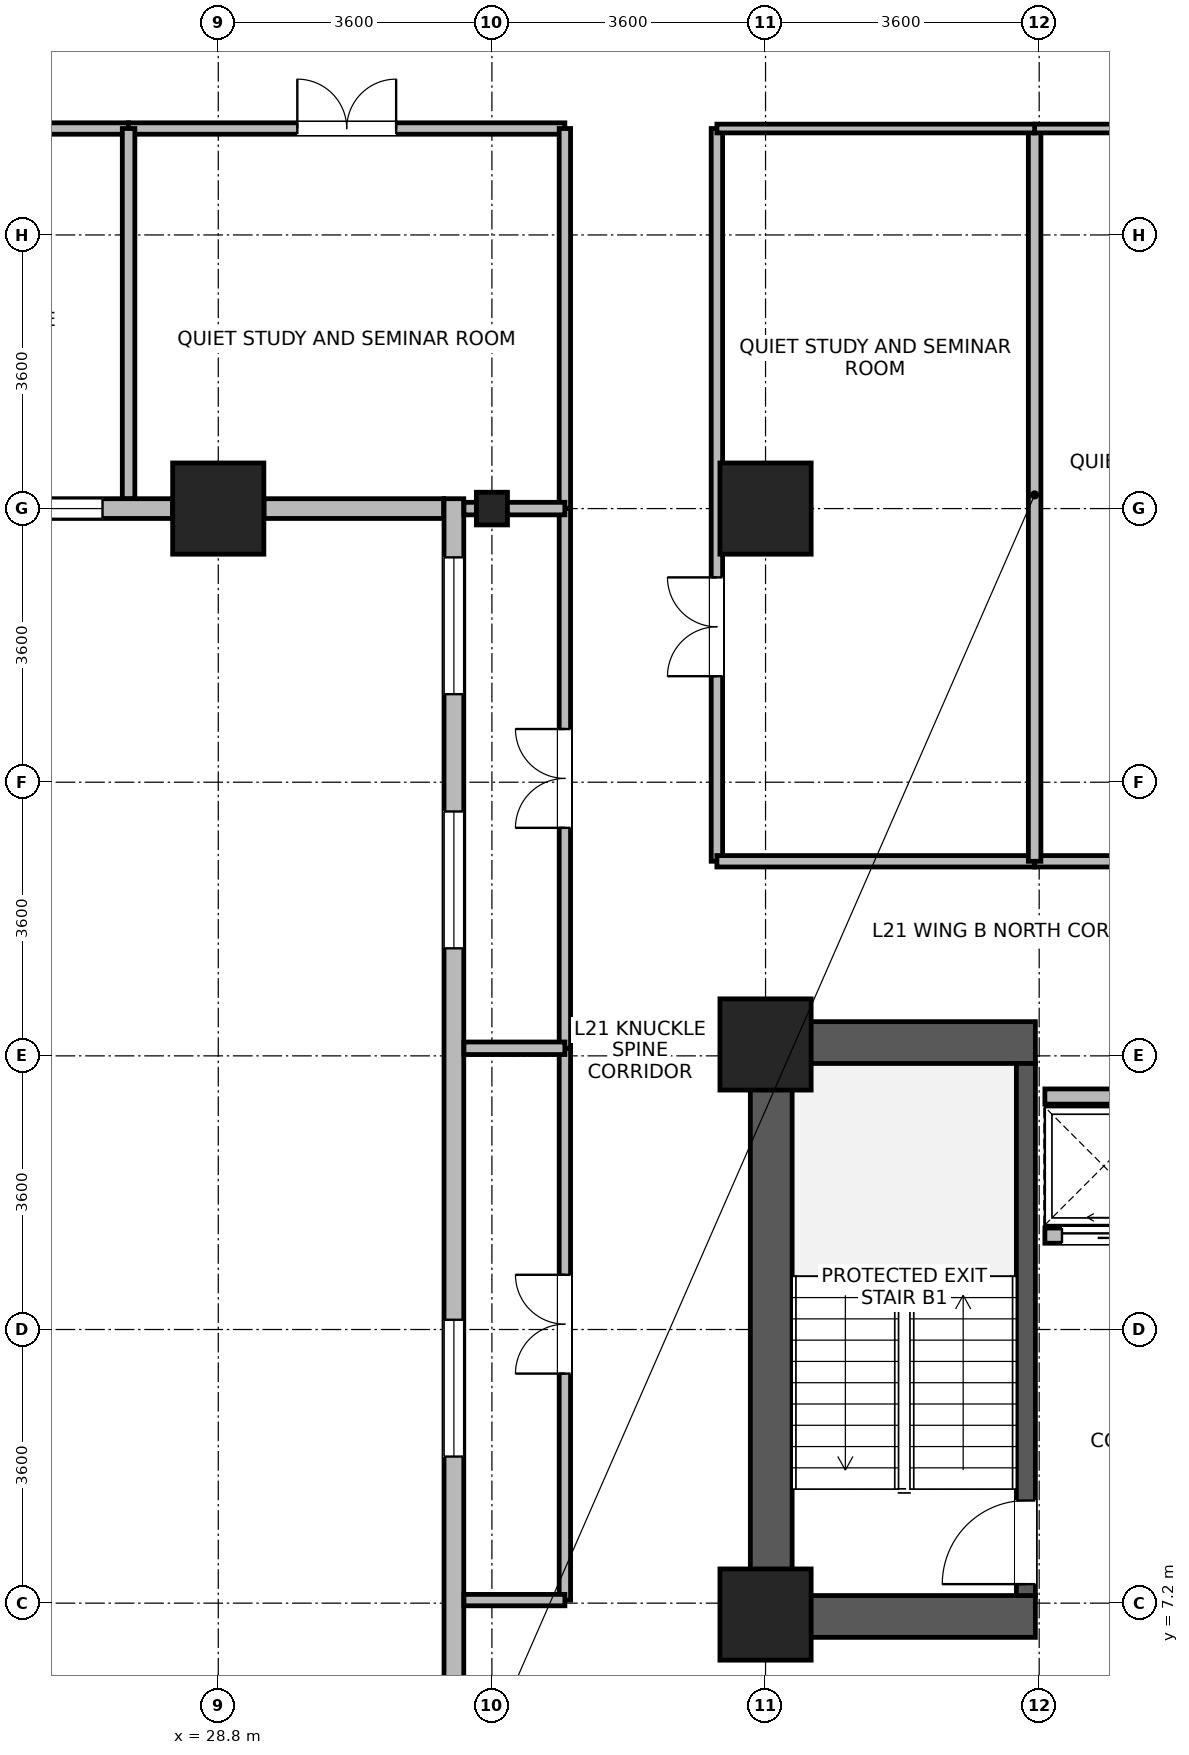
"""IFC4 building model, lengths in metres.
Left out: names, types, materials, properties, quantities, classifications, styles, units other than length and angle.
Written with IfcOpenShell. Run it as: python <this file> out.ifc"""

import sys

from ifc_helpers import new_model, si_unit, direction, frame, frame_2d, origin, origin_2d, place, context, subcontext, project, spatial, rectangle, i_section, extrude, source, transform, mapped, element, fill, save


model = new_model("IFC4")
c1 = context("Model", 3, precision=1e-05, world=origin(), true_north=direction((0.0, 1.0)))
c2 = subcontext(c1, "Body", "Model", "MODEL_VIEW")
j1 = project(units=[si_unit("LENGTHUNIT", "METRE"), si_unit("PLANEANGLEUNIT", "RADIAN")], contexts=[c1])
p1 = place(None, origin())
s1 = spatial("IfcSite", under=j1, at=p1, CompositionType="ELEMENT")
p2 = place(p1, origin())
s2 = spatial("IfcBuilding", under=s1, at=p2, CompositionType="ELEMENT")
p3 = place(p2, frame((0.0, 0.0, 86.0)))
s3 = spatial("IfcBuildingStorey", under=s2, at=p3, CompositionType="ELEMENT", Elevation=86.0)
p4 = place(p3, frame((36.075, 6.75, 0.0), z_axis=(0.0, 0.0, 1.0), x_axis=(0.0, 1.0, 0.0)))
e1 = element("IfcWall", 1, at=p4, inside=s3, PredefinedType="SHEAR", context=c2, shape_type="SweptSolid", body=[
    extrude(rectangle(XDim=8.1, YDim=0.55, at=frame_2d((4.05, 0.0))), origin(), (0.0, 0.0, 1.0), 3.45),
])
for number, where, z_axis, x_axis in (
    (2, (36.35, 7.025, 0.0), (0.0, 0.0, 1.0), (1.0, 0.0, 0.0)),
    (3, (36.35, 14.575, 0.0), (0.0, 0.0, 1.0), (1.0, 0.0, 0.0)),
):
    element("IfcWall", number, at=place(p3, frame(where, z_axis=z_axis, x_axis=x_axis)), inside=s3, PredefinedType="SHEAR", context=c2, shape_type="SweptSolid", body=[
        extrude(rectangle(XDim=3.2, YDim=0.55, at=frame_2d((1.6, 0.0))), origin(), (0.0, 0.0, 1.0), 3.45),
    ])
p5 = place(p3, frame((39.425, 7.3, 0.0), z_axis=(0.0, 0.0, 1.0), x_axis=(0.0, 1.0, 0.0)))
e4 = element("IfcWall", 4, at=p5, inside=s3, PredefinedType="SHEAR", context=c2, shape_type="SweptSolid", body=[
    extrude(rectangle(XDim=7.0, YDim=0.25, at=frame_2d((3.5, 0.0))), origin(), (0.0, 0.0, 1.0), 3.45),
])
p6 = place(p5, frame((0.15, 0.0, 0.0)))
e5 = element("IfcOpeningElement", 5, at=p6, cuts=e4, PredefinedType="OPENING", context=c2, shape_type="SweptSolid", body=[
    extrude(rectangle(XDim=1.1, YDim=2.08, at=frame_2d((0.55, 1.04))), frame((0.0, 0.135, 0.0), z_axis=(0.0, -1.0, 0.0), x_axis=(1.0, 0.0, 0.0)), (0.0, 0.0, 1.0), 0.27),
])
m1 = source(origin(), c2, "Body", "SweptSolid", [
    extrude(rectangle(XDim=1.2, YDim=1.2, at=origin_2d()), origin(), (0.0, 0.0, 1.0), 3.7),
])
for number, where, z_axis, x_axis in (
    (6, (28.8, 21.6, 0.0), (0.0, 0.0, 1.0), (1.0, 0.0, 0.0)),
    (7, (36.0, 21.6, 0.0), (0.0, 0.0, 1.0), (1.0, 0.0, 0.0)),
    (8, (36.0, 7.05, 0.0), (0.0, 0.0, 1.0), (1.0, 0.0, 0.0)),
    (9, (36.0, 14.55, 0.0), (0.0, 0.0, 1.0), (1.0, 0.0, 0.0)),
):
    element("IfcColumn", number, at=place(p3, frame(where, z_axis=z_axis, x_axis=x_axis)), inside=s3, PredefinedType="COLUMN", context=c2, shape_type="MappedRepresentation", body=[
        mapped(m1, transform((0.0, 0.0, 0.0), x_axis=(1.0, 0.0, 0.0), y_axis=(0.0, 1.0, 0.0), z_axis=(0.0, 0.0, 1.0), scale=1.0)),
    ])
m2 = source(origin(), c2, "Body", "SweptSolid", [
    extrude(i_section(OverallWidth=0.409, OverallDepth=0.43, WebThickness=0.024, FlangeThickness=0.033, FilletRadius=0.015, at=origin_2d()), origin(), (0.0, 0.0, 1.0), 3.7),
])
p7 = place(p3, frame((32.4, 21.6, 0.0), z_axis=(0.0, 0.0, 1.0), x_axis=(1.0, 0.0, 0.0)))
e10 = element("IfcColumn", 10, at=p7, inside=s3, PredefinedType="COLUMN", context=c2, shape_type="MappedRepresentation", body=[
    mapped(m2, transform((0.0, 0.0, 0.0), x_axis=(1.0, 0.0, 0.0), y_axis=(0.0, 1.0, 0.0), z_axis=(0.0, 0.0, 1.0), scale=1.0)),
])
p8 = place(p3, frame((28.199, 21.6, 0.0), z_axis=(0.0, 0.0, 1.0), x_axis=(-1.0, 0.0, 0.0)))
e11 = element("IfcWall", 11, at=p8, inside=s3, PredefinedType="STANDARD", context=c2, shape_type="SweptSolid", body=[
    extrude(rectangle(XDim=2.793, YDim=0.26, at=frame_2d((1.397, 0.0))), origin(), (0.0, 0.0, 1.0), 2.93),
])
p9 = place(p8, frame((0.922, 0.0, 0.85)))
e12 = element("IfcOpeningElement", 12, at=p9, cuts=e11, PredefinedType="OPENING", context=c2, shape_type="SweptSolid", body=[
    extrude(rectangle(XDim=0.95, YDim=1.75, at=frame_2d((0.475, 0.875))), frame((0.0, 0.14, 0.0), z_axis=(0.0, -1.0, 0.0), x_axis=(1.0, 0.0, 0.0)), (0.0, 0.0, 1.0), 0.28),
])
p10 = place(p3, frame((31.765, 21.6, 0.0), z_axis=(0.0, 0.0, 1.0), x_axis=(-1.0, 0.0, 0.0)))
e13 = element("IfcWall", 13, at=p10, inside=s3, PredefinedType="STANDARD", context=c2, shape_type="SweptSolid", body=[
    extrude(rectangle(XDim=2.364, YDim=0.26, at=frame_2d((1.182, 0.0))), origin(), (0.0, 0.0, 1.0), 2.93),
])
p11 = place(p3, frame((31.9, 1.67, 0.0), z_axis=(0.0, 0.0, 1.0), x_axis=(0.0, 1.0, 0.0)))
e14 = element("IfcWall", 14, at=p11, inside=s3, PredefinedType="STANDARD", context=c2, shape_type="SweptSolid", body=[
    extrude(rectangle(XDim=20.06, YDim=0.26, at=frame_2d((10.03, 0.0))), origin(), (0.0, 0.0, 1.0), 3.43),
])
p12 = place(p11, frame((0.772, 0.0, 0.85)))
e15 = element("IfcOpeningElement", 15, at=p12, cuts=e14, PredefinedType="OPENING", context=c2, shape_type="SweptSolid", body=[
    extrude(rectangle(XDim=1.8, YDim=1.85, at=frame_2d((0.9, 0.925))), frame((0.0, 0.14, 0.0), z_axis=(0.0, -1.0, 0.0), x_axis=(1.0, 0.0, 0.0)), (0.0, 0.0, 1.0), 0.28),
])
p13 = place(p11, frame((7.458, 0.0, 0.85)))
e16 = element("IfcOpeningElement", 16, at=p13, cuts=e14, PredefinedType="OPENING", context=c2, shape_type="SweptSolid", body=[
    extrude(rectangle(XDim=1.8, YDim=1.85, at=frame_2d((0.9, 0.925))), frame((0.0, 0.14, 0.0), z_axis=(0.0, -1.0, 0.0), x_axis=(1.0, 0.0, 0.0)), (0.0, 0.0, 1.0), 0.28),
])
p14 = place(p11, frame((14.145, 0.0, 0.85)))
e17 = element("IfcOpeningElement", 17, at=p14, cuts=e14, PredefinedType="OPENING", context=c2, shape_type="SweptSolid", body=[
    extrude(rectangle(XDim=1.8, YDim=1.85, at=frame_2d((0.9, 0.925))), frame((0.0, 0.14, 0.0), z_axis=(0.0, -1.0, 0.0), x_axis=(1.0, 0.0, 0.0)), (0.0, 0.0, 1.0), 0.28),
])
p15 = place(p11, frame((17.488, 0.0, 0.85)))
e18 = element("IfcOpeningElement", 18, at=p15, cuts=e14, PredefinedType="OPENING", context=c2, shape_type="SweptSolid", body=[
    extrude(rectangle(XDim=1.8, YDim=1.85, at=frame_2d((0.9, 0.925))), frame((0.0, 0.14, 0.0), z_axis=(0.0, -1.0, 0.0), x_axis=(1.0, 0.0, 0.0)), (0.0, 0.0, 1.0), 0.28),
])
p16 = place(p3, frame((39.675, 12.035, 0.0), z_axis=(0.0, 0.0, 1.0), x_axis=(1.0, 0.0, 0.0)))
e19 = element("IfcWall", 19, at=p16, inside=s3, PredefinedType="PARTITIONING", context=c2, shape_type="SweptSolid", body=[
    extrude(rectangle(XDim=1.55, YDim=0.2, at=frame_2d((0.775, 0.0))), origin(), (0.0, 0.0, 1.0), 3.43),
])
p17 = place(p16, frame((0.225, 0.0, 0.0)))
e20 = element("IfcOpeningElement", 20, at=p17, cuts=e19, PredefinedType="OPENING", context=c2, shape_type="SweptSolid", body=[
    extrude(rectangle(XDim=1.1, YDim=2.12, at=frame_2d((0.55, 1.06))), frame((0.0, 0.11, 0.0), z_axis=(0.0, -1.0, 0.0), x_axis=(1.0, 0.0, 0.0)), (0.0, 0.0, 1.0), 0.22),
])
p18 = place(p3, frame((39.675, 13.865, 0.0), z_axis=(0.0, 0.0, 1.0), x_axis=(1.0, 0.0, 0.0)))
e21 = element("IfcWall", 21, at=p18, inside=s3, PredefinedType="PARTITIONING", context=c2, shape_type="SweptSolid", body=[
    extrude(rectangle(XDim=1.55, YDim=0.2, at=frame_2d((0.775, 0.0))), origin(), (0.0, 0.0, 1.0), 3.43),
])
p19 = place(p3, frame((17.66, 26.6, 0.0), z_axis=(0.0, 0.0, 1.0), x_axis=(1.0, 0.0, 0.0)))
e22 = element("IfcWall", 22, at=p19, inside=s3, PredefinedType="PARTITIONING", context=c2, shape_type="SweptSolid", body=[
    extrude(rectangle(XDim=9.96, YDim=0.15, at=frame_2d((4.98, 0.0))), origin(), (0.0, 0.0, 1.0), 3.43),
])
p20 = place(p19, frame((4.33, 0.0, 0.0)))
e23 = element("IfcOpeningElement", 23, at=p20, cuts=e22, PredefinedType="OPENING", context=c2, shape_type="SweptSolid", body=[
    extrude(rectangle(XDim=1.3, YDim=2.12, at=frame_2d((0.65, 1.06))), frame((0.0, 0.085, 0.0), z_axis=(0.0, -1.0, 0.0), x_axis=(1.0, 0.0, 0.0)), (0.0, 0.0, 1.0), 0.17),
])
p21 = place(p3, frame((35.36, 16.96, 0.0), z_axis=(0.0, 0.0, 1.0), x_axis=(0.0, 1.0, 0.0)))
e24 = element("IfcWall", 24, at=p21, inside=s3, PredefinedType="PARTITIONING", context=c2, shape_type="SweptSolid", body=[
    extrude(rectangle(XDim=9.64, YDim=0.15, at=frame_2d((4.82, 0.0))), origin(), (0.0, 0.0, 1.0), 3.43),
])
p22 = place(p21, frame((2.435, 0.0, 0.0)))
e25 = element("IfcOpeningElement", 25, at=p22, cuts=e24, PredefinedType="OPENING", context=c2, shape_type="SweptSolid", body=[
    extrude(rectangle(XDim=1.3, YDim=2.12, at=frame_2d((0.65, 1.06))), frame((0.0, 0.085, 0.0), z_axis=(0.0, -1.0, 0.0), x_axis=(1.0, 0.0, 0.0)), (0.0, 0.0, 1.0), 0.17),
])
p23 = place(p3, frame((33.36, 7.24, 0.0), z_axis=(0.0, 0.0, 1.0), x_axis=(0.0, 1.0, 0.0)))
e26 = element("IfcWall", 26, at=p23, inside=s3, PredefinedType="PARTITIONING", context=c2, shape_type="SweptSolid", body=[
    extrude(rectangle(XDim=7.26, YDim=0.15, at=frame_2d((3.63, 0.0))), origin(), (0.0, 0.0, 1.0), 3.43),
])
p24 = place(p23, frame((2.98, 0.0, 0.0)))
e27 = element("IfcOpeningElement", 27, at=p24, cuts=e26, PredefinedType="OPENING", context=c2, shape_type="SweptSolid", body=[
    extrude(rectangle(XDim=1.3, YDim=2.12, at=frame_2d((0.65, 1.06))), frame((0.0, 0.085, 0.0), z_axis=(0.0, -1.0, 0.0), x_axis=(1.0, 0.0, 0.0)), (0.0, 0.0, 1.0), 0.17),
])
p25 = place(p3, frame((33.36, 14.5, 0.0), z_axis=(0.0, 0.0, 1.0), x_axis=(0.0, 1.0, 0.0)))
e28 = element("IfcWall", 28, at=p25, inside=s3, PredefinedType="PARTITIONING", context=c2, shape_type="SweptSolid", body=[
    extrude(rectangle(XDim=7.1, YDim=0.15, at=frame_2d((3.55, 0.0))), origin(), (0.0, 0.0, 1.0), 3.43),
])
p26 = place(p25, frame((2.9, 0.0, 0.0)))
e29 = element("IfcOpeningElement", 29, at=p26, cuts=e28, PredefinedType="OPENING", context=c2, shape_type="SweptSolid", body=[
    extrude(rectangle(XDim=1.3, YDim=2.12, at=frame_2d((0.65, 1.06))), frame((0.0, 0.085, 0.0), z_axis=(0.0, -1.0, 0.0), x_axis=(1.0, 0.0, 0.0)), (0.0, 0.0, 1.0), 0.17),
])
p27 = place(p3, frame((27.62, 26.6, 0.0), z_axis=(0.0, 0.0, 1.0), x_axis=(1.0, 0.0, 0.0)))
e30 = element("IfcWall", 30, at=p27, inside=s3, PredefinedType="PARTITIONING", context=c2, shape_type="SweptSolid", body=[
    extrude(rectangle(XDim=5.74, YDim=0.15, at=frame_2d((2.87, 0.0))), origin(), (0.0, 0.0, 1.0), 3.43),
])
p28 = place(p27, frame((2.22, 0.0, 0.0)))
e31 = element("IfcOpeningElement", 31, at=p28, cuts=e30, PredefinedType="OPENING", context=c2, shape_type="SweptSolid", body=[
    extrude(rectangle(XDim=1.3, YDim=2.12, at=frame_2d((0.65, 1.06))), frame((0.0, 0.085, 0.0), z_axis=(0.0, -1.0, 0.0), x_axis=(1.0, 0.0, 0.0)), (0.0, 0.0, 1.0), 0.17),
])
p29 = place(p3, frame((33.36, 21.6, 0.0), z_axis=(0.0, 0.0, 1.0), x_axis=(0.0, 1.0, 0.0)))
e32 = element("IfcWall", 32, at=p29, inside=s3, PredefinedType="PARTITIONING", context=c2, shape_type="SweptSolid", body=[
    extrude(rectangle(XDim=5.0, YDim=0.15, at=frame_2d((2.5, 0.0))), origin(), (0.0, 0.0, 1.0), 3.43),
])
p30 = place(p3, frame((39.54, 16.96, 0.0), z_axis=(0.0, 0.0, 1.0), x_axis=(1.0, 0.0, 0.0)))
e33 = element("IfcWall", 33, at=p30, inside=s3, PredefinedType="PARTITIONING", context=c2, shape_type="SweptSolid", body=[
    extrude(rectangle(XDim=4.5, YDim=0.15, at=frame_2d((2.25, 0.0))), origin(), (0.0, 0.0, 1.0), 3.43),
])
p31 = place(p30, frame((1.6, 0.0, 0.0)))
e34 = element("IfcOpeningElement", 34, at=p31, cuts=e33, PredefinedType="OPENING", context=c2, shape_type="SweptSolid", body=[
    extrude(rectangle(XDim=1.3, YDim=2.12, at=frame_2d((0.65, 1.06))), frame((0.0, 0.085, 0.0), z_axis=(0.0, -1.0, 0.0), x_axis=(1.0, 0.0, 0.0)), (0.0, 0.0, 1.0), 0.17),
])
p32 = place(p3, frame((35.36, 16.96, 0.0), z_axis=(0.0, 0.0, 1.0), x_axis=(1.0, 0.0, 0.0)))
e35 = element("IfcWall", 35, at=p32, inside=s3, PredefinedType="PARTITIONING", context=c2, shape_type="SweptSolid", body=[
    extrude(rectangle(XDim=4.18, YDim=0.15, at=frame_2d((2.09, 0.0))), origin(), (0.0, 0.0, 1.0), 3.43),
])
p33 = place(p3, frame((32.032, 7.24, 0.0), z_axis=(0.0, 0.0, 1.0), x_axis=(1.0, 0.0, 0.0)))
e36 = element("IfcWall", 36, at=p33, inside=s3, PredefinedType="PARTITIONING", context=c2, shape_type="SweptSolid", body=[
    extrude(rectangle(XDim=1.328, YDim=0.15, at=frame_2d((0.664, 0.0))), origin(), (0.0, 0.0, 1.0), 3.43),
])
p34 = place(p3, frame((39.54, 16.96, 0.0), z_axis=(0.0, 0.0, 1.0), x_axis=(0.0, 1.0, 0.0)))
e37 = element("IfcWall", 37, at=p34, inside=s3, PredefinedType="PARTITIONING", context=c2, shape_type="SweptSolid", body=[
    extrude(rectangle(XDim=9.64, YDim=0.165, at=frame_2d((4.82, 0.0))), origin(), (0.0, 0.0, 1.0), 3.43),
])
p35 = place(p3, frame((27.62, 21.732, 0.0), z_axis=(0.0, 0.0, 1.0), x_axis=(0.0, 1.0, 0.0)))
e38 = element("IfcWall", 38, at=p35, inside=s3, PredefinedType="PARTITIONING", context=c2, shape_type="SweptSolid", body=[
    extrude(rectangle(XDim=4.868, YDim=0.165, at=frame_2d((2.434, 0.0))), origin(), (0.0, 0.0, 1.0), 3.43),
])
p36 = place(p3, frame((39.54, 26.6, 0.0), z_axis=(0.0, 0.0, 1.0), x_axis=(1.0, 0.0, 0.0)))
e39 = element("IfcWall", 39, at=p36, inside=s3, PredefinedType="PARTITIONING", context=c2, shape_type="SweptSolid", body=[
    extrude(rectangle(XDim=4.5, YDim=0.115, at=frame_2d((2.25, 0.0))), origin(), (0.0, 0.0, 1.0), 3.43),
])
p37 = place(p3, frame((35.36, 26.6, 0.0), z_axis=(0.0, 0.0, 1.0), x_axis=(1.0, 0.0, 0.0)))
e40 = element("IfcWall", 40, at=p37, inside=s3, PredefinedType="PARTITIONING", context=c2, shape_type="SweptSolid", body=[
    extrude(rectangle(XDim=4.18, YDim=0.115, at=frame_2d((2.09, 0.0))), origin(), (0.0, 0.0, 1.0), 3.43),
])
p38 = place(p3, frame((32.032, 14.5, 0.0), z_axis=(0.0, 0.0, 1.0), x_axis=(1.0, 0.0, 0.0)))
e41 = element("IfcWall", 41, at=p38, inside=s3, PredefinedType="PARTITIONING", context=c2, shape_type="SweptSolid", body=[
    extrude(rectangle(XDim=1.328, YDim=0.165, at=frame_2d((0.664, 0.0))), origin(), (0.0, 0.0, 1.0), 3.43),
])
p39 = place(p3, frame((32.032, 21.6, 0.0), z_axis=(0.0, 0.0, 1.0), x_axis=(1.0, 0.0, 0.0)))
e42 = element("IfcWall", 42, at=p39, inside=s3, PredefinedType="PARTITIONING", context=c2, shape_type="SweptSolid", body=[
    extrude(rectangle(XDim=1.328, YDim=0.165, at=frame_2d((0.664, 0.0))), origin(), (0.0, 0.0, 1.0), 2.93),
])
p40 = place(p9, origin())
e43 = element("IfcWindow", 43, at=p40, inside=s3, PartitioningType="SINGLE_PANEL", PredefinedType="WINDOW", context=c2, shape_type="SweptSolid", body=[
    extrude(rectangle(XDim=0.95, YDim=1.75, at=frame_2d((0.475, 0.875))), frame((0.0, 0.03, 0.0), z_axis=(0.0, -1.0, 0.0), x_axis=(1.0, 0.0, 0.0)), (0.0, 0.0, 1.0), 0.06),
])
fill(e12, e43)
p41 = place(p13, origin())
e44 = element("IfcWindow", 44, at=p41, inside=s3, PartitioningType="SINGLE_PANEL", PredefinedType="WINDOW", context=c2, shape_type="SweptSolid", body=[
    extrude(rectangle(XDim=1.8, YDim=1.85, at=frame_2d((0.9, 0.925))), frame((0.0, 0.03, 0.0), z_axis=(0.0, -1.0, 0.0), x_axis=(1.0, 0.0, 0.0)), (0.0, 0.0, 1.0), 0.06),
])
fill(e16, e44)
p42 = place(p14, origin())
e45 = element("IfcWindow", 45, at=p42, inside=s3, PartitioningType="SINGLE_PANEL", PredefinedType="WINDOW", context=c2, shape_type="SweptSolid", body=[
    extrude(rectangle(XDim=1.8, YDim=1.85, at=frame_2d((0.9, 0.925))), frame((0.0, 0.03, 0.0), z_axis=(0.0, -1.0, 0.0), x_axis=(1.0, 0.0, 0.0)), (0.0, 0.0, 1.0), 0.06),
])
fill(e17, e45)
p43 = place(p15, origin())
e46 = element("IfcWindow", 46, at=p43, inside=s3, PartitioningType="SINGLE_PANEL", PredefinedType="WINDOW", context=c2, shape_type="SweptSolid", body=[
    extrude(rectangle(XDim=1.8, YDim=1.85, at=frame_2d((0.9, 0.925))), frame((0.0, 0.03, 0.0), z_axis=(0.0, -1.0, 0.0), x_axis=(1.0, 0.0, 0.0)), (0.0, 0.0, 1.0), 0.06),
])
fill(e18, e46)
p44 = place(p6, origin())
e47 = element("IfcDoor", 47, at=p44, inside=s3, OperationType="SINGLE_SWING_LEFT", PredefinedType="DOOR", context=c2, shape_type="SweptSolid", body=[
    extrude(rectangle(XDim=1.1, YDim=2.08, at=frame_2d((0.55, 1.04))), frame((0.0, 0.025, 0.0), z_axis=(0.0, -1.0, 0.0), x_axis=(1.0, 0.0, 0.0)), (0.0, 0.0, 1.0), 0.05),
])
fill(e5, e47)
p45 = place(p17, origin())
e48 = element("IfcDoor", 48, at=p45, inside=s3, OperationType="SLIDING_TO_LEFT", PredefinedType="DOOR", context=c2, shape_type="SweptSolid", body=[
    extrude(rectangle(XDim=1.1, YDim=2.12, at=frame_2d((0.55, 1.06))), frame((0.0, 0.025, 0.0), z_axis=(0.0, -1.0, 0.0), x_axis=(1.0, 0.0, 0.0)), (0.0, 0.0, 1.0), 0.05),
])
fill(e20, e48)
p46 = place(p22, origin())
e49 = element("IfcDoor", 49, at=p46, inside=s3, OperationType="DOUBLE_DOOR_SINGLE_SWING", PredefinedType="DOOR", context=c2, shape_type="SweptSolid", body=[
    extrude(rectangle(XDim=1.3, YDim=2.12, at=frame_2d((0.65, 1.06))), frame((0.0, 0.025, 0.0), z_axis=(0.0, -1.0, 0.0), x_axis=(1.0, 0.0, 0.0)), (0.0, 0.0, 1.0), 0.05),
])
fill(e25, e49)
p47 = place(p24, origin())
e50 = element("IfcDoor", 50, at=p47, inside=s3, OperationType="DOUBLE_DOOR_SINGLE_SWING", PredefinedType="DOOR", context=c2, shape_type="SweptSolid", body=[
    extrude(rectangle(XDim=1.3, YDim=2.12, at=frame_2d((0.65, 1.06))), frame((0.0, 0.025, 0.0), z_axis=(0.0, -1.0, 0.0), x_axis=(1.0, 0.0, 0.0)), (0.0, 0.0, 1.0), 0.05),
])
fill(e27, e50)
p48 = place(p26, origin())
e51 = element("IfcDoor", 51, at=p48, inside=s3, OperationType="DOUBLE_DOOR_SINGLE_SWING", PredefinedType="DOOR", context=c2, shape_type="SweptSolid", body=[
    extrude(rectangle(XDim=1.3, YDim=2.12, at=frame_2d((0.65, 1.06))), frame((0.0, 0.025, 0.0), z_axis=(0.0, -1.0, 0.0), x_axis=(1.0, 0.0, 0.0)), (0.0, 0.0, 1.0), 0.05),
])
fill(e29, e51)
p49 = place(p28, origin())
e52 = element("IfcDoor", 52, at=p49, inside=s3, OperationType="DOUBLE_DOOR_SINGLE_SWING", PredefinedType="DOOR", context=c2, shape_type="SweptSolid", body=[
    extrude(rectangle(XDim=1.3, YDim=2.12, at=frame_2d((0.65, 1.06))), frame((0.0, 0.025, 0.0), z_axis=(0.0, -1.0, 0.0), x_axis=(1.0, 0.0, 0.0)), (0.0, 0.0, 1.0), 0.05),
])
fill(e31, e52)
save(model, sys.argv[1])
